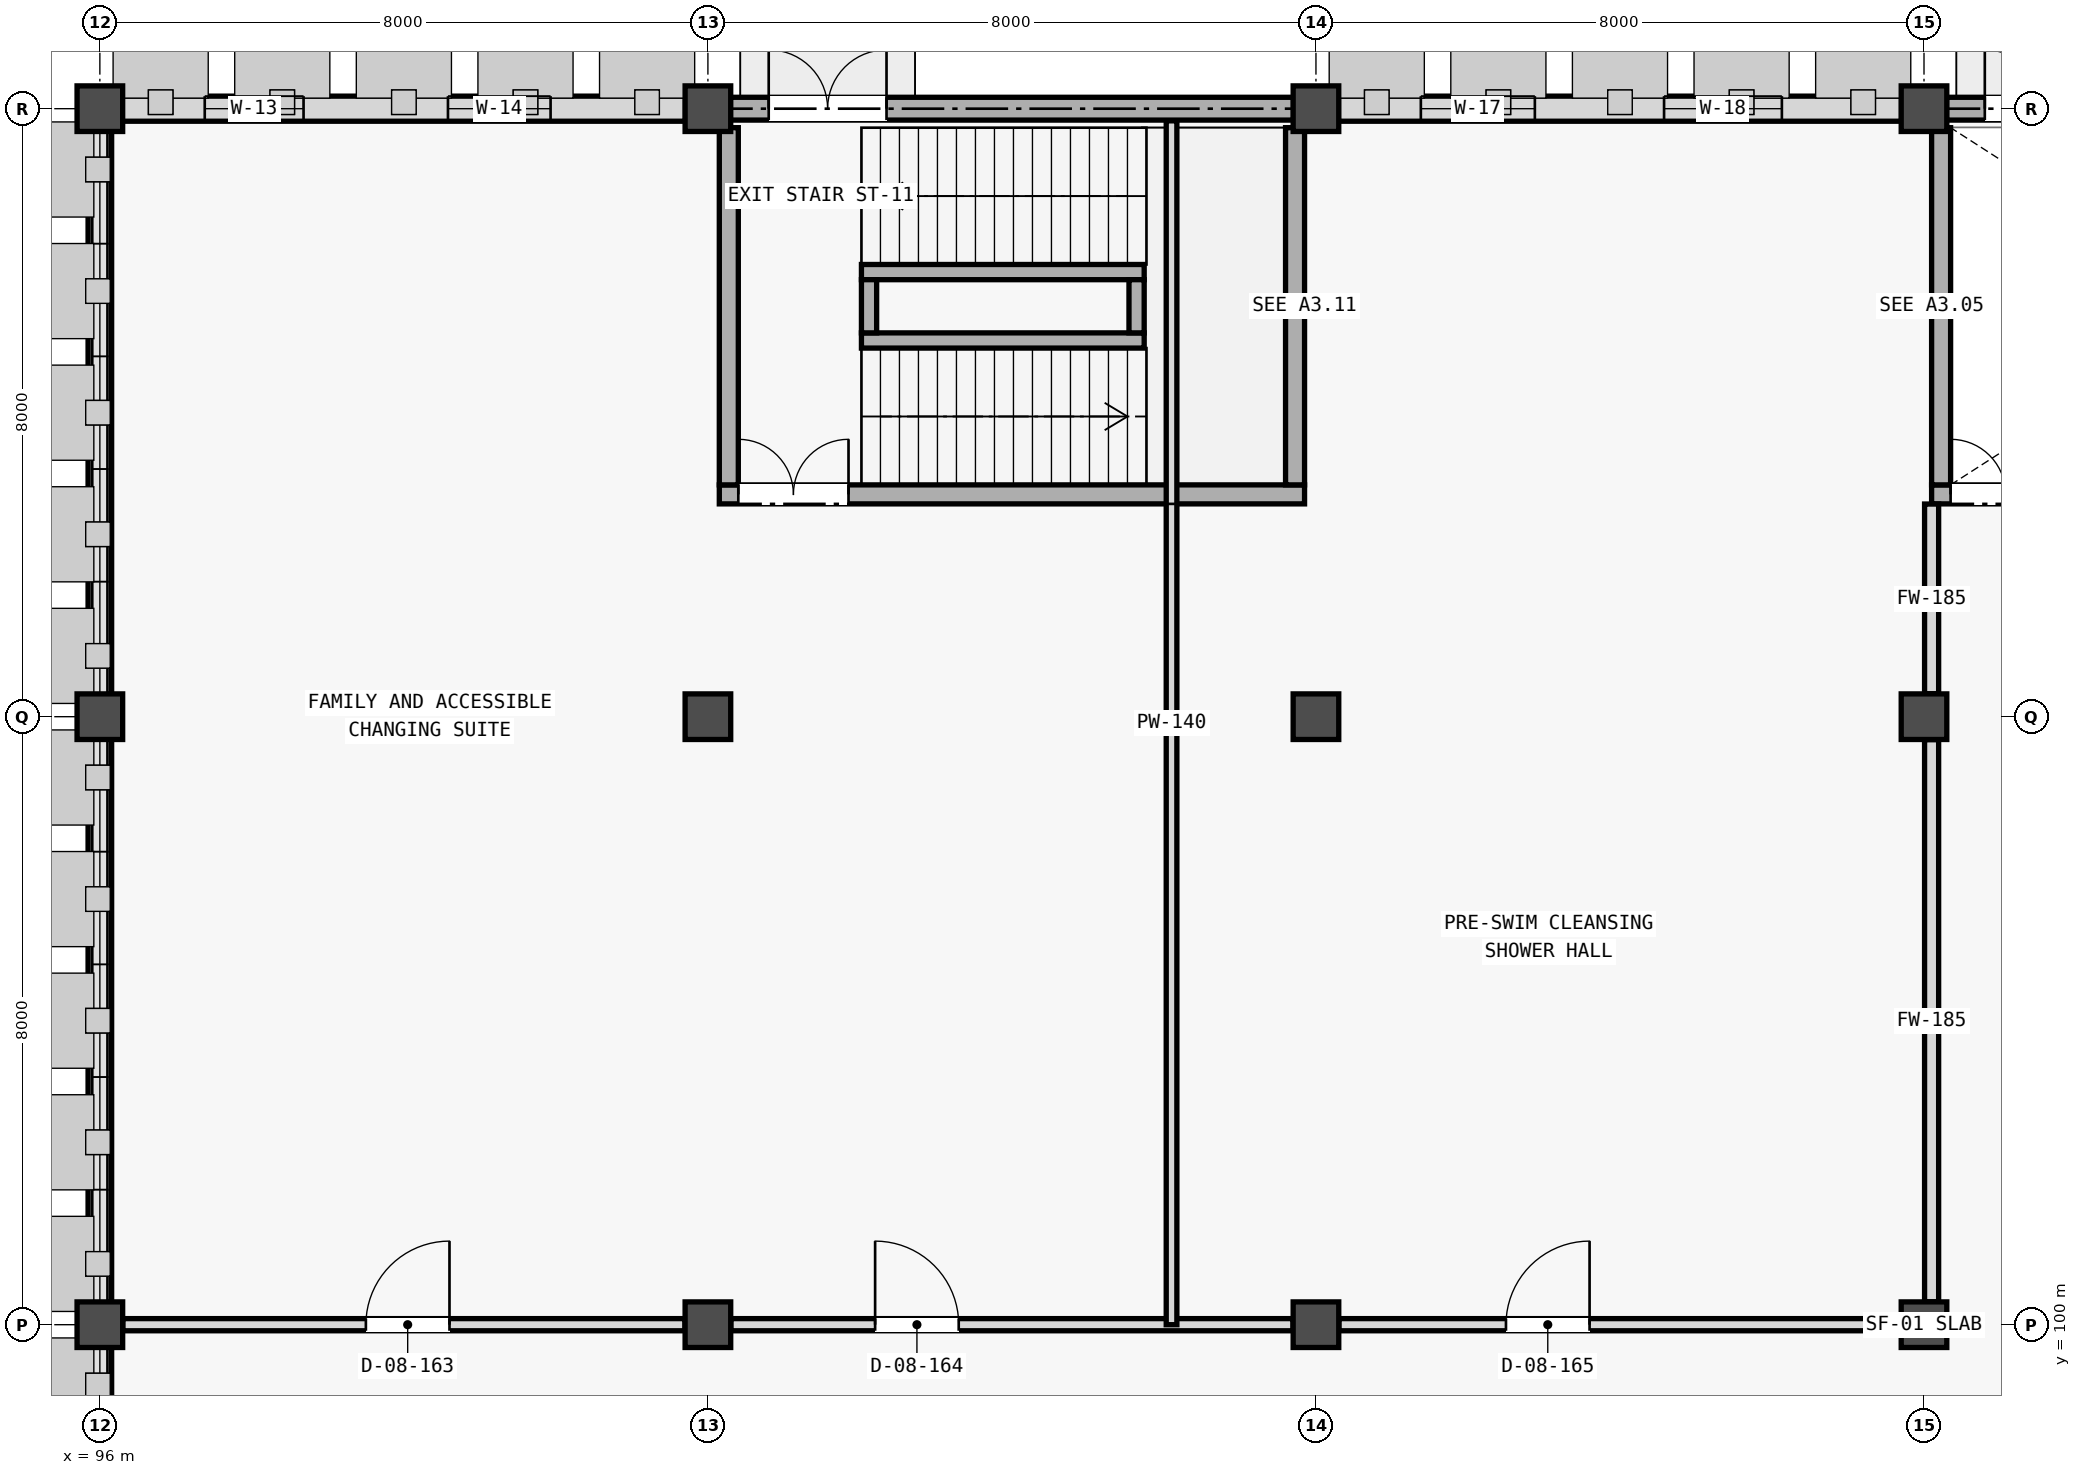
"""IFC4 building model, lengths in metres.
Left out: names, types, materials, properties, quantities, classifications, styles, units other than length and angle.
Written with IfcOpenShell. Run it as: python <this file> out.ifc"""

import sys

from ifc_helpers import new_model, si_unit, direction, frame, frame_2d, origin, origin_2d, place, context, subcontext, project, spatial, rectangle, extrude, element, fill, save


model = new_model("IFC4")
c1 = context("Model", 3, precision=1e-05, world=origin(), true_north=direction((0.0, 1.0)))
c2 = subcontext(c1, "Body", "Model", "MODEL_VIEW")
j1 = project(units=[si_unit("LENGTHUNIT", "METRE"), si_unit("PLANEANGLEUNIT", "RADIAN")], contexts=[c1])
p1 = place(None, origin())
s1 = spatial("IfcSite", under=j1, at=p1, CompositionType="ELEMENT")
p2 = place(p1, origin())
s2 = spatial("IfcBuilding", under=s1, at=p2, CompositionType="ELEMENT")
p3 = place(p2, origin())
s3 = spatial("IfcBuildingStorey", under=s2, at=p3, CompositionType="ELEMENT", Elevation=0.0)
for number, where, z_axis, x_axis in (
    (1, (96.0, 100.0, 0.0), (0.0, 0.0, 1.0), (1.0, 0.0, 0.0)),
    (2, (96.0, 108.0, 0.0), (0.0, 0.0, 1.0), (1.0, 0.0, 0.0)),
    (3, (96.0, 116.0, 0.0), (0.0, 0.0, 1.0), (1.0, 0.0, 0.0)),
    (4, (104.0, 100.0, 0.0), (0.0, 0.0, 1.0), (1.0, 0.0, 0.0)),
    (5, (104.0, 108.0, 0.0), (0.0, 0.0, 1.0), (1.0, 0.0, 0.0)),
    (6, (104.0, 116.0, 0.0), (0.0, 0.0, 1.0), (1.0, 0.0, 0.0)),
    (7, (112.0, 100.0, 0.0), (0.0, 0.0, 1.0), (1.0, 0.0, 0.0)),
    (8, (112.0, 108.0, 0.0), (0.0, 0.0, 1.0), (1.0, 0.0, 0.0)),
    (9, (112.0, 116.0, 0.0), (0.0, 0.0, 1.0), (1.0, 0.0, 0.0)),
    (10, (120.0, 100.0, 0.0), (0.0, 0.0, 1.0), (1.0, 0.0, 0.0)),
    (11, (120.0, 108.0, 0.0), (0.0, 0.0, 1.0), (1.0, 0.0, 0.0)),
    (12, (120.0, 116.0, 0.0), (0.0, 0.0, 1.0), (1.0, 0.0, 0.0)),
):
    element("IfcColumn", number, at=place(p3, frame(where, z_axis=z_axis, x_axis=x_axis)), inside=s3, PredefinedType="COLUMN", context=c2, shape_type="SweptSolid", body=[
        extrude(rectangle(XDim=0.6, YDim=0.6, at=origin_2d()), origin(), (0.0, 0.0, 1.0), 5.125),
    ])
p4 = place(p3, frame((96.296, 116.0, 0.0), z_axis=(0.0, 0.0, 1.0), x_axis=(1.0, 0.0, 0.0)))
e13 = element("IfcWall", 13, at=p4, inside=s3, PredefinedType="STANDARD", context=c2, shape_type="SweptSolid", body=[
    extrude(rectangle(XDim=7.408, YDim=0.33, at=frame_2d((3.704, 0.0))), origin(), (0.0, 0.0, 1.0), 4.25),
])
p5 = place(p4, frame((1.084, 0.0, 1.45)))
e14 = element("IfcOpeningElement", 14, at=p5, cuts=e13, PredefinedType="OPENING", context=c2, shape_type="SweptSolid", body=[
    extrude(rectangle(XDim=1.3, YDim=1.4, at=frame_2d((0.65, 0.7))), frame((0.0, 0.175, 0.0), z_axis=(0.0, -1.0, 0.0), x_axis=(1.0, 0.0, 0.0)), (0.0, 0.0, 1.0), 0.35),
])
p6 = place(p4, frame((4.284, 0.0, 1.45)))
e15 = element("IfcOpeningElement", 15, at=p6, cuts=e13, PredefinedType="OPENING", context=c2, shape_type="SweptSolid", body=[
    extrude(rectangle(XDim=1.35, YDim=1.65, at=frame_2d((0.675, 0.825))), frame((0.0, 0.175, 0.0), z_axis=(0.0, -1.0, 0.0), x_axis=(1.0, 0.0, 0.0)), (0.0, 0.0, 1.0), 0.35),
])
p7 = place(p3, frame((104.296, 116.0, 0.0), z_axis=(0.0, 0.0, 1.0), x_axis=(1.0, 0.0, 0.0)))
e16 = element("IfcWall", 16, at=p7, inside=s3, PredefinedType="SHEAR", context=c2, shape_type="SweptSolid", body=[
    extrude(rectangle(XDim=7.408, YDim=0.3, at=frame_2d((3.704, 0.0))), origin(), (0.0, 0.0, 1.0), 5.4),
])
p8 = place(p7, frame((0.504, 0.0, 0.0)))
e17 = element("IfcOpeningElement", 17, at=p8, cuts=e16, PredefinedType="OPENING", context=c2, shape_type="SweptSolid", body=[
    extrude(rectangle(XDim=1.55, YDim=2.2, at=frame_2d((0.775, 1.1))), frame((0.0, 0.16, 0.0), z_axis=(0.0, -1.0, 0.0), x_axis=(1.0, 0.0, 0.0)), (0.0, 0.0, 1.0), 0.32),
])
p9 = place(p3, frame((112.296, 116.0, 0.0), z_axis=(0.0, 0.0, 1.0), x_axis=(1.0, 0.0, 0.0)))
e18 = element("IfcWall", 18, at=p9, inside=s3, PredefinedType="STANDARD", context=c2, shape_type="SweptSolid", body=[
    extrude(rectangle(XDim=7.408, YDim=0.33, at=frame_2d((3.704, 0.0))), origin(), (0.0, 0.0, 1.0), 4.25),
])
p10 = place(p9, frame((1.084, 0.0, 1.45)))
e19 = element("IfcOpeningElement", 19, at=p10, cuts=e18, PredefinedType="OPENING", context=c2, shape_type="SweptSolid", body=[
    extrude(rectangle(XDim=1.5, YDim=1.75, at=frame_2d((0.75, 0.875))), frame((0.0, 0.175, 0.0), z_axis=(0.0, -1.0, 0.0), x_axis=(1.0, 0.0, 0.0)), (0.0, 0.0, 1.0), 0.35),
])
p11 = place(p9, frame((4.284, 0.0, 1.45)))
e20 = element("IfcOpeningElement", 20, at=p11, cuts=e18, PredefinedType="OPENING", context=c2, shape_type="SweptSolid", body=[
    extrude(rectangle(XDim=1.55, YDim=1.95, at=frame_2d((0.775, 0.975))), frame((0.0, 0.175, 0.0), z_axis=(0.0, -1.0, 0.0), x_axis=(1.0, 0.0, 0.0)), (0.0, 0.0, 1.0), 0.35),
])
p12 = place(p3, frame((120.296, 116.0, 0.0), z_axis=(0.0, 0.0, 1.0), x_axis=(1.0, 0.0, 0.0)))
e21 = element("IfcWall", 21, at=p12, inside=s3, PredefinedType="SHEAR", context=c2, shape_type="SweptSolid", body=[
    extrude(rectangle(XDim=7.408, YDim=0.3, at=frame_2d((3.704, 0.0))), origin(), (0.0, 0.0, 1.0), 5.4),
])
p13 = place(p12, frame((0.504, 0.0, 0.0)))
e22 = element("IfcOpeningElement", 22, at=p13, cuts=e21, PredefinedType="OPENING", context=c2, shape_type="SweptSolid", body=[
    extrude(rectangle(XDim=1.55, YDim=2.2, at=frame_2d((0.775, 1.1))), frame((0.0, 0.16, 0.0), z_axis=(0.0, -1.0, 0.0), x_axis=(1.0, 0.0, 0.0)), (0.0, 0.0, 1.0), 0.32),
])
for number, where, z_axis, x_axis in (
    (23, (96.0, 92.296, 0.0), (0.0, 0.0, 1.0), (0.0, 1.0, 0.0)),
    (24, (96.0, 100.296, 0.0), (0.0, 0.0, 1.0), (0.0, 1.0, 0.0)),
    (25, (96.0, 108.296, 0.0), (0.0, 0.0, 1.0), (0.0, 1.0, 0.0)),
):
    element("IfcWall", number, at=place(p3, frame(where, z_axis=z_axis, x_axis=x_axis)), inside=s3, PredefinedType="STANDARD", context=c2, shape_type="SweptSolid", body=[
        extrude(rectangle(XDim=7.408, YDim=0.31, at=frame_2d((3.704, 0.0))), origin(), (0.0, 0.0, 1.0), 1.45),
    ])
p14 = place(p3, frame((120.1, 110.925, 0.0), z_axis=(0.0, 0.0, 1.0), x_axis=(1.0, 0.0, 0.0)))
e26 = element("IfcWall", 26, at=p14, inside=s3, PredefinedType="SHEAR", context=c2, shape_type="SweptSolid", body=[
    extrude(rectangle(XDim=7.8, YDim=0.25, at=frame_2d((3.9, 0.0))), origin(), (0.0, 0.0, 1.0), 5.4),
])
p15 = place(p14, frame((0.25, 0.0, 0.0)))
e27 = element("IfcOpeningElement", 27, at=p15, cuts=e26, PredefinedType="OPENING", context=c2, shape_type="SweptSolid", body=[
    extrude(rectangle(XDim=1.45, YDim=2.2, at=frame_2d((0.725, 1.1))), frame((0.0, 0.135, 0.0), z_axis=(0.0, -1.0, 0.0), x_axis=(1.0, 0.0, 0.0)), (0.0, 0.0, 1.0), 0.27),
])
p16 = place(p3, frame((120.225, 111.05, 0.0), z_axis=(0.0, 0.0, 1.0), x_axis=(0.0, 1.0, 0.0)))
e28 = element("IfcWall", 28, at=p16, inside=s3, PredefinedType="SHEAR", context=c2, shape_type="SweptSolid", body=[
    extrude(rectangle(XDim=4.7, YDim=0.25, at=frame_2d((2.35, 0.0))), origin(), (0.0, 0.0, 1.0), 5.4),
])
p17 = place(p3, frame((104.15, 110.925, 0.0), z_axis=(0.0, 0.0, 1.0), x_axis=(1.0, 0.0, 0.0)))
e29 = element("IfcWall", 29, at=p17, inside=s3, PredefinedType="SHEAR", context=c2, shape_type="SweptSolid", body=[
    extrude(rectangle(XDim=7.7, YDim=0.25, at=frame_2d((3.85, 0.0))), origin(), (0.0, 0.0, 1.0), 5.4),
])
p18 = place(p17, frame((0.25, 0.0, 0.0)))
e30 = element("IfcOpeningElement", 30, at=p18, cuts=e29, PredefinedType="OPENING", context=c2, shape_type="SweptSolid", body=[
    extrude(rectangle(XDim=1.45, YDim=2.2, at=frame_2d((0.725, 1.1))), frame((0.0, 0.135, 0.0), z_axis=(0.0, -1.0, 0.0), x_axis=(1.0, 0.0, 0.0)), (0.0, 0.0, 1.0), 0.27),
])
for number, where, z_axis, x_axis in (
    (31, (104.275, 111.05, 0.0), (0.0, 0.0, 1.0), (0.0, 1.0, 0.0)),
    (32, (111.725, 111.05, 0.0), (0.0, 0.0, 1.0), (0.0, 1.0, 0.0)),
):
    element("IfcWall", number, at=place(p3, frame(where, z_axis=z_axis, x_axis=x_axis)), inside=s3, PredefinedType="SHEAR", context=c2, shape_type="SweptSolid", body=[
        extrude(rectangle(XDim=4.7, YDim=0.25, at=frame_2d((2.35, 0.0))), origin(), (0.0, 0.0, 1.0), 5.4),
    ])
for number, where, z_axis, x_axis in (
    (33, (106.02, 112.95, 0.0), (0.0, 0.0, 1.0), (1.0, 0.0, 0.0)),
    (34, (106.02, 113.85, 0.0), (0.0, 0.0, 1.0), (1.0, 0.0, 0.0)),
):
    element("IfcWall", number, at=place(p3, frame(where, z_axis=z_axis, x_axis=x_axis)), inside=s3, PredefinedType="SHEAR", context=c2, shape_type="SweptSolid", body=[
        extrude(rectangle(XDim=3.72, YDim=0.2, at=frame_2d((1.86, 0.0))), origin(), (0.0, 0.0, 1.0), 5.4),
    ])
for number, where, z_axis, x_axis in (
    (35, (106.12, 113.05, 0.0), (0.0, 0.0, 1.0), (0.0, 1.0, 0.0)),
    (36, (109.64, 113.05, 0.0), (0.0, 0.0, 1.0), (0.0, 1.0, 0.0)),
):
    element("IfcWall", number, at=place(p3, frame(where, z_axis=z_axis, x_axis=x_axis)), inside=s3, PredefinedType="SHEAR", context=c2, shape_type="SweptSolid", body=[
        extrude(rectangle(XDim=0.7, YDim=0.2, at=frame_2d((0.35, 0.0))), origin(), (0.0, 0.0, 1.0), 5.4),
    ])
p19 = place(p3, frame((96.302, 100.0, 0.0), z_axis=(0.0, 0.0, 1.0), x_axis=(1.0, 0.0, 0.0)))
e37 = element("IfcWall", 37, at=p19, inside=s3, PredefinedType="PARTITIONING", context=c2, shape_type="SweptSolid", body=[
    extrude(rectangle(XDim=7.396, YDim=0.16, at=frame_2d((3.698, 0.0))), origin(), (0.0, 0.0, 1.0), 4.355),
])
p20 = place(p19, frame((3.198, 0.0, 0.0)))
e38 = element("IfcOpeningElement", 38, at=p20, cuts=e37, PredefinedType="OPENING", context=c2, shape_type="SweptSolid", body=[
    extrude(rectangle(XDim=1.1, YDim=2.15, at=frame_2d((0.55, 1.075))), frame((0.0, 0.09, 0.0), z_axis=(0.0, -1.0, 0.0), x_axis=(1.0, 0.0, 0.0)), (0.0, 0.0, 1.0), 0.18),
])
p21 = place(p3, frame((104.302, 100.0, 0.0), z_axis=(0.0, 0.0, 1.0), x_axis=(1.0, 0.0, 0.0)))
e39 = element("IfcWall", 39, at=p21, inside=s3, PredefinedType="PARTITIONING", context=c2, shape_type="SweptSolid", body=[
    extrude(rectangle(XDim=7.396, YDim=0.16, at=frame_2d((3.698, 0.0))), origin(), (0.0, 0.0, 1.0), 4.355),
])
p22 = place(p21, frame((1.898, 0.0, 0.0)))
e40 = element("IfcOpeningElement", 40, at=p22, cuts=e39, PredefinedType="OPENING", context=c2, shape_type="SweptSolid", body=[
    extrude(rectangle(XDim=1.1, YDim=2.15, at=frame_2d((0.55, 1.075))), frame((0.0, 0.09, 0.0), z_axis=(0.0, -1.0, 0.0), x_axis=(1.0, 0.0, 0.0)), (0.0, 0.0, 1.0), 0.18),
])
p23 = place(p3, frame((112.302, 100.0, 0.0), z_axis=(0.0, 0.0, 1.0), x_axis=(1.0, 0.0, 0.0)))
e41 = element("IfcWall", 41, at=p23, inside=s3, PredefinedType="PARTITIONING", context=c2, shape_type="SweptSolid", body=[
    extrude(rectangle(XDim=7.396, YDim=0.16, at=frame_2d((3.698, 0.0))), origin(), (0.0, 0.0, 1.0), 4.355),
])
p24 = place(p23, frame((2.198, 0.0, 0.0)))
e42 = element("IfcOpeningElement", 42, at=p24, cuts=e41, PredefinedType="OPENING", context=c2, shape_type="SweptSolid", body=[
    extrude(rectangle(XDim=1.1, YDim=2.15, at=frame_2d((0.55, 1.075))), frame((0.0, 0.09, 0.0), z_axis=(0.0, -1.0, 0.0), x_axis=(1.0, 0.0, 0.0)), (0.0, 0.0, 1.0), 0.18),
])
p25 = place(p3, frame((120.1, 100.302, 0.0), z_axis=(0.0, 0.0, 1.0), x_axis=(0.0, 1.0, 0.0)))
e43 = element("IfcWall", 43, at=p25, inside=s3, PredefinedType="STANDARD", context=c2, shape_type="SweptSolid", body=[
    extrude(rectangle(XDim=7.396, YDim=0.185, at=frame_2d((3.698, 0.0))), origin(), (0.0, 0.0, 1.0), 4.405),
])
p26 = place(p3, frame((120.1, 108.302, 0.0), z_axis=(0.0, 0.0, 1.0), x_axis=(0.0, 1.0, 0.0)))
e44 = element("IfcWall", 44, at=p26, inside=s3, PredefinedType="STANDARD", context=c2, shape_type="SweptSolid", body=[
    extrude(rectangle(XDim=2.496, YDim=0.185, at=frame_2d((1.248, 0.0))), origin(), (0.0, 0.0, 1.0), 4.405),
])
p27 = place(p3, frame((110.1, 100.0, 0.0), z_axis=(0.0, 0.0, 1.0), x_axis=(0.0, 1.0, 0.0)))
e45 = element("IfcWall", 45, at=p27, inside=s3, PredefinedType="PLUMBINGWALL", context=c2, shape_type="SweptSolid", body=[
    extrude(rectangle(XDim=15.84, YDim=0.14, at=frame_2d((7.92, 0.0))), origin(), (0.0, 0.0, 1.0), 4.305),
])
p28 = place(p5, origin())
e46 = element("IfcWindow", 46, at=p28, inside=s3, PartitioningType="SINGLE_PANEL", PredefinedType="WINDOW", context=c2, shape_type="SweptSolid", body=[
    extrude(rectangle(XDim=1.3, YDim=1.4, at=frame_2d((0.65, 0.7))), frame((0.0, 0.03, 0.0), z_axis=(0.0, -1.0, 0.0), x_axis=(1.0, 0.0, 0.0)), (0.0, 0.0, 1.0), 0.06),
])
fill(e14, e46)
p29 = place(p6, origin())
e47 = element("IfcWindow", 47, at=p29, inside=s3, PartitioningType="SINGLE_PANEL", PredefinedType="WINDOW", context=c2, shape_type="SweptSolid", body=[
    extrude(rectangle(XDim=1.35, YDim=1.65, at=frame_2d((0.675, 0.825))), frame((0.0, 0.03, 0.0), z_axis=(0.0, -1.0, 0.0), x_axis=(1.0, 0.0, 0.0)), (0.0, 0.0, 1.0), 0.06),
])
fill(e15, e47)
p30 = place(p8, origin())
e48 = element("IfcDoor", 48, at=p30, inside=s3, OperationType="DOUBLE_DOOR_SINGLE_SWING", PredefinedType="DOOR", context=c2, shape_type="SweptSolid", body=[
    extrude(rectangle(XDim=1.55, YDim=2.2, at=frame_2d((0.775, 1.1))), frame((0.0, 0.025, 0.0), z_axis=(0.0, -1.0, 0.0), x_axis=(1.0, 0.0, 0.0)), (0.0, 0.0, 1.0), 0.05),
])
fill(e17, e48)
p31 = place(p10, origin())
e49 = element("IfcWindow", 49, at=p31, inside=s3, PartitioningType="SINGLE_PANEL", PredefinedType="WINDOW", context=c2, shape_type="SweptSolid", body=[
    extrude(rectangle(XDim=1.5, YDim=1.75, at=frame_2d((0.75, 0.875))), frame((0.0, 0.03, 0.0), z_axis=(0.0, -1.0, 0.0), x_axis=(1.0, 0.0, 0.0)), (0.0, 0.0, 1.0), 0.06),
])
fill(e19, e49)
p32 = place(p11, origin())
e50 = element("IfcWindow", 50, at=p32, inside=s3, PartitioningType="SINGLE_PANEL", PredefinedType="WINDOW", context=c2, shape_type="SweptSolid", body=[
    extrude(rectangle(XDim=1.55, YDim=1.95, at=frame_2d((0.775, 0.975))), frame((0.0, 0.03, 0.0), z_axis=(0.0, -1.0, 0.0), x_axis=(1.0, 0.0, 0.0)), (0.0, 0.0, 1.0), 0.06),
])
fill(e20, e50)
p33 = place(p13, origin())
e51 = element("IfcDoor", 51, at=p33, inside=s3, OperationType="DOUBLE_DOOR_SINGLE_SWING", PredefinedType="DOOR", context=c2, shape_type="SweptSolid", body=[
    extrude(rectangle(XDim=1.55, YDim=2.2, at=frame_2d((0.775, 1.1))), frame((0.0, 0.025, 0.0), z_axis=(0.0, -1.0, 0.0), x_axis=(1.0, 0.0, 0.0)), (0.0, 0.0, 1.0), 0.05),
])
fill(e22, e51)
p34 = place(p15, origin())
e52 = element("IfcDoor", 52, at=p34, inside=s3, OperationType="DOUBLE_DOOR_SINGLE_SWING", PredefinedType="DOOR", context=c2, shape_type="SweptSolid", body=[
    extrude(rectangle(XDim=1.45, YDim=2.2, at=frame_2d((0.725, 1.1))), frame((0.0, 0.025, 0.0), z_axis=(0.0, -1.0, 0.0), x_axis=(1.0, 0.0, 0.0)), (0.0, 0.0, 1.0), 0.05),
])
fill(e27, e52)
p35 = place(p18, origin())
e53 = element("IfcDoor", 53, at=p35, inside=s3, OperationType="DOUBLE_DOOR_SINGLE_SWING", PredefinedType="DOOR", context=c2, shape_type="SweptSolid", body=[
    extrude(rectangle(XDim=1.45, YDim=2.2, at=frame_2d((0.725, 1.1))), frame((0.0, 0.025, 0.0), z_axis=(0.0, -1.0, 0.0), x_axis=(1.0, 0.0, 0.0)), (0.0, 0.0, 1.0), 0.05),
])
fill(e30, e53)
p36 = place(p20, origin())
e54 = element("IfcDoor", 54, at=p36, inside=s3, OperationType="SINGLE_SWING_RIGHT", PredefinedType="DOOR", context=c2, shape_type="SweptSolid", body=[
    extrude(rectangle(XDim=1.1, YDim=2.15, at=frame_2d((0.55, 1.075))), frame((0.0, 0.025, 0.0), z_axis=(0.0, -1.0, 0.0), x_axis=(1.0, 0.0, 0.0)), (0.0, 0.0, 1.0), 0.05),
])
fill(e38, e54)
p37 = place(p22, origin())
e55 = element("IfcDoor", 55, at=p37, inside=s3, OperationType="SINGLE_SWING_LEFT", PredefinedType="DOOR", context=c2, shape_type="SweptSolid", body=[
    extrude(rectangle(XDim=1.1, YDim=2.15, at=frame_2d((0.55, 1.075))), frame((0.0, 0.025, 0.0), z_axis=(0.0, -1.0, 0.0), x_axis=(1.0, 0.0, 0.0)), (0.0, 0.0, 1.0), 0.05),
])
fill(e40, e55)
p38 = place(p24, origin())
e56 = element("IfcDoor", 56, at=p38, inside=s3, OperationType="SINGLE_SWING_RIGHT", PredefinedType="DOOR", context=c2, shape_type="SweptSolid", body=[
    extrude(rectangle(XDim=1.1, YDim=2.15, at=frame_2d((0.55, 1.075))), frame((0.0, 0.025, 0.0), z_axis=(0.0, -1.0, 0.0), x_axis=(1.0, 0.0, 0.0)), (0.0, 0.0, 1.0), 0.05),
])
fill(e42, e56)
save(model, sys.argv[1])
